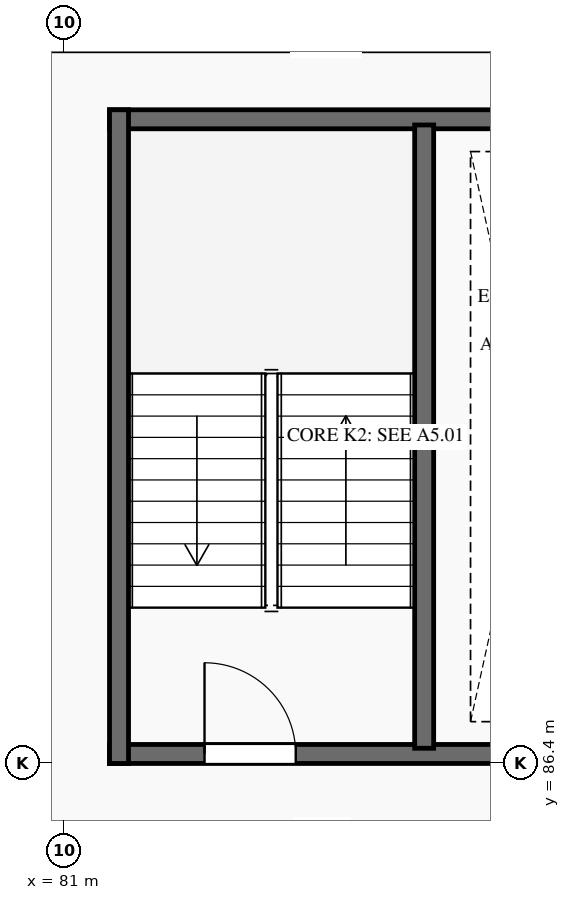
"""IFC4 building model, lengths in metres.
Left out: names, types, materials, properties, quantities, classifications, styles, units other than length and angle.
Written with IfcOpenShell. Run it as: python <this file> out.ifc"""

import sys

from ifc_helpers import new_model, si_unit, direction, frame, frame_2d, origin, place, context, subcontext, project, spatial, rectangle, extrude, element, fill, save


model = new_model("IFC4")
c1 = context("Model", 3, precision=1e-05, world=origin(), true_north=direction((0.0, 1.0)))
c2 = subcontext(c1, "Body", "Model", "MODEL_VIEW")
j1 = project(units=[si_unit("LENGTHUNIT", "METRE"), si_unit("PLANEANGLEUNIT", "RADIAN")], contexts=[c1])
p1 = place(None, origin())
s1 = spatial("IfcSite", under=j1, at=p1, CompositionType="ELEMENT")
p2 = place(p1, origin())
s2 = spatial("IfcBuilding", under=s1, at=p2, CompositionType="ELEMENT")
p3 = place(p2, frame((0.0, 0.0, 10.8)))
s3 = spatial("IfcBuildingStorey", under=s2, at=p3, CompositionType="ELEMENT", Elevation=10.8)
p4 = place(p3, frame((81.6, 86.525, 0.0), z_axis=(0.0, 0.0, 1.0), x_axis=(1.0, 0.0, 0.0)))
e1 = element("IfcWall", 1, at=p4, inside=s3, PredefinedType="SHEAR", context=c2, shape_type="SweptSolid", body=[
    extrude(rectangle(XDim=7.0, YDim=0.25, at=frame_2d((3.5, 0.0))), origin(), (0.0, 0.0, 1.0), 4.2),
])
p5 = place(p4, frame((1.25, 0.0, 0.0)))
e2 = element("IfcOpeningElement", 2, at=p5, cuts=e1, PredefinedType="OPENING", context=c2, shape_type="SweptSolid", body=[
    extrude(rectangle(XDim=1.2, YDim=2.15, at=frame_2d((0.6, 1.075))), frame((0.0, 0.14, 0.0), z_axis=(0.0, -1.0, 0.0), x_axis=(1.0, 0.0, 0.0)), (0.0, 0.0, 1.0), 0.28),
])
p6 = place(p3, frame((81.6, 94.875, 0.0), z_axis=(0.0, 0.0, 1.0), x_axis=(1.0, 0.0, 0.0)))
e3 = element("IfcWall", 3, at=p6, inside=s3, PredefinedType="SHEAR", context=c2, shape_type="SweptSolid", body=[
    extrude(rectangle(XDim=7.0, YDim=0.25, at=frame_2d((3.5, 0.0))), origin(), (0.0, 0.0, 1.0), 4.2),
])
p7 = place(p3, frame((81.725, 86.4, 0.0), z_axis=(0.0, 0.0, 1.0), x_axis=(0.0, 1.0, 0.0)))
e4 = element("IfcWall", 4, at=p7, inside=s3, PredefinedType="SHEAR", context=c2, shape_type="SweptSolid", body=[
    extrude(rectangle(XDim=8.6, YDim=0.25, at=frame_2d((4.3, 0.0))), origin(), (0.0, 0.0, 1.0), 4.2),
])
p8 = place(p3, frame((85.74, 86.6, 0.0), z_axis=(0.0, 0.0, 1.0), x_axis=(0.0, 1.0, 0.0)))
e5 = element("IfcWall", 5, at=p8, inside=s3, PredefinedType="SHEAR", context=c2, shape_type="SweptSolid", body=[
    extrude(rectangle(XDim=8.2, YDim=0.25, at=frame_2d((4.1, 0.0))), origin(), (0.0, 0.0, 1.0), 4.2),
])
p9 = place(p5, origin())
e6 = element("IfcDoor", 6, at=p9, inside=s3, OperationType="SINGLE_SWING_LEFT", PredefinedType="DOOR", context=c2, shape_type="SweptSolid", body=[
    extrude(rectangle(XDim=1.2, YDim=2.15, at=frame_2d((0.6, 1.075))), frame((0.0, 0.025, 0.0), z_axis=(0.0, -1.0, 0.0), x_axis=(1.0, 0.0, 0.0)), (0.0, 0.0, 1.0), 0.05),
])
fill(e2, e6)
save(model, sys.argv[1])
